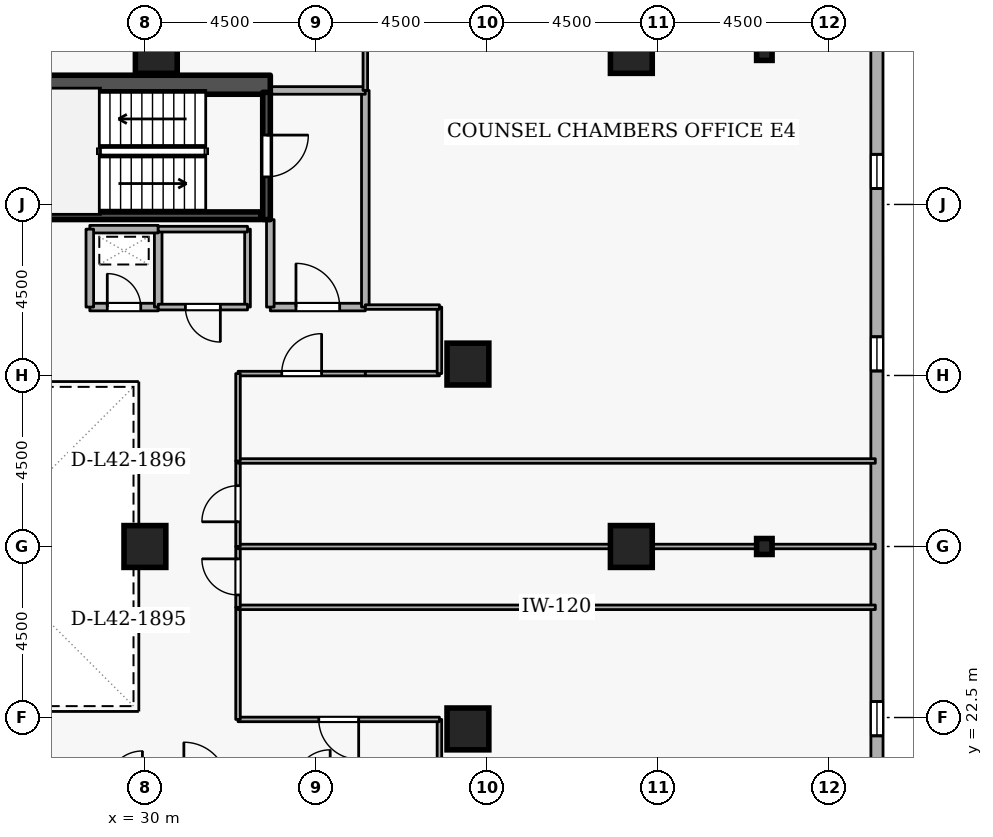
"""IFC4 building model, lengths in metres.
Left out: names, types, materials, properties, quantities, classifications, styles, units other than length and angle.
Written with IfcOpenShell. Run it as: python <this file> out.ifc"""

import sys

from ifc_helpers import new_model, si_unit, direction, frame, frame_2d, origin, origin_2d, place, context, subcontext, project, spatial, rectangle, i_section, extrude, element, fill, save


model = new_model("IFC4")
c1 = context("Model", 3, precision=1e-05, world=origin(), true_north=direction((0.0, 1.0)))
c2 = subcontext(c1, "Body", "Model", "MODEL_VIEW")
j1 = project(units=[si_unit("LENGTHUNIT", "METRE"), si_unit("PLANEANGLEUNIT", "RADIAN")], contexts=[c1])
p1 = place(None, origin())
s1 = spatial("IfcSite", under=j1, at=p1, CompositionType="ELEMENT")
p2 = place(p1, origin())
s2 = spatial("IfcBuilding", under=s1, at=p2, CompositionType="ELEMENT")
p3 = place(p2, frame((0.0, 0.0, 159.9)))
s3 = spatial("IfcBuildingStorey", under=s2, at=p3, CompositionType="ELEMENT", Elevation=159.9)
p4 = place(p3, frame((17.7, 39.15, 0.0), z_axis=(0.0, 0.0, 1.0), x_axis=(1.0, 0.0, 0.0)))
e1 = element("IfcWall", 1, at=p4, inside=s3, PredefinedType="SHEAR", context=c2, shape_type="SweptSolid", body=[
    extrude(rectangle(XDim=15.6, YDim=0.5, at=frame_2d((7.8, 0.0))), origin(), (0.0, 0.0, 1.0), 3.6),
])
for number, where, z_axis, x_axis in (
    (2, (42.8, 27.0, 0.0), (0.0, 0.0, 1.0), (1.0, 0.0, 0.0)),
    (3, (42.8, 40.0, 0.0), (0.0, 0.0, 1.0), (1.0, 0.0, 0.0)),
    (4, (38.5, 22.2, 0.0), (0.0, 0.0, 1.0), (1.0, 0.0, 0.0)),
    (5, (38.5, 31.8, 0.0), (0.0, 0.0, 1.0), (1.0, 0.0, 0.0)),
    (6, (30.3, 40.0, 0.0), (0.0, 0.0, 1.0), (1.0, 0.0, 0.0)),
    (7, (30.0, 27.0, 0.0), (0.0, 0.0, 1.0), (1.0, 0.0, 0.0)),
):
    element("IfcColumn", number, at=place(p3, frame(where, z_axis=z_axis, x_axis=x_axis)), inside=s3, PredefinedType="COLUMN", context=c2, shape_type="SweptSolid", body=[
        extrude(rectangle(XDim=1.1, YDim=1.1, at=origin_2d()), origin(), (0.0, 0.0, 1.0), 3.6),
    ])
for number, where, z_axis, x_axis in (
    (8, (46.3, 27.0, 0.0), (0.0, 0.0, 1.0), (1.0, 0.0, 0.0)),
    (9, (46.3, 40.0, 0.0), (0.0, 0.0, 1.0), (1.0, 0.0, 0.0)),
):
    element("IfcColumn", number, at=place(p3, frame(where, z_axis=z_axis, x_axis=x_axis)), inside=s3, PredefinedType="COLUMN", context=c2, shape_type="SweptSolid", body=[
        extrude(i_section(OverallWidth=0.407, OverallDepth=0.419, WebThickness=0.031, FlangeThickness=0.049, FilletRadius=0.015, at=origin_2d()), origin(), (0.0, 0.0, 1.0), 3.6),
    ])
p5 = place(p3, frame((49.265, 5.819, 0.0), z_axis=(0.0, 0.0, 1.0), x_axis=(-7.5574884e-05, 0.999999997144, 0.0)))
e10 = element("IfcWall", 10, at=p5, inside=s3, PredefinedType="STANDARD", context=c2, shape_type="SweptSolid", body=[
    extrude(rectangle(XDim=35.535, YDim=0.32, at=frame_2d((17.768, 0.0))), origin(), (0.0, 0.0, 1.0), 2.7),
])
p6 = place(p5, frame((1.8, 0.0, 0.72)))
e11 = element("IfcOpeningElement", 11, at=p6, cuts=e10, PredefinedType="OPENING", context=c2, shape_type="SweptSolid", body=[
    extrude(rectangle(XDim=0.9, YDim=1.75, at=frame_2d((0.45, 0.875))), frame((0.0, 0.17, 0.0), z_axis=(0.0, -1.0, 0.0), x_axis=(1.0, 0.0, 0.0)), (0.0, 0.0, 1.0), 0.34),
])
p7 = place(p5, frame((6.6, 0.0, 0.72)))
e12 = element("IfcOpeningElement", 12, at=p7, cuts=e10, PredefinedType="OPENING", context=c2, shape_type="SweptSolid", body=[
    extrude(rectangle(XDim=0.9, YDim=1.75, at=frame_2d((0.45, 0.875))), frame((0.0, 0.17, 0.0), z_axis=(0.0, -1.0, 0.0), x_axis=(1.0, 0.0, 0.0)), (0.0, 0.0, 1.0), 0.34),
])
p8 = place(p5, frame((11.4, 0.0, 0.72)))
e13 = element("IfcOpeningElement", 13, at=p8, cuts=e10, PredefinedType="OPENING", context=c2, shape_type="SweptSolid", body=[
    extrude(rectangle(XDim=0.9, YDim=1.75, at=frame_2d((0.45, 0.875))), frame((0.0, 0.17, 0.0), z_axis=(0.0, -1.0, 0.0), x_axis=(1.0, 0.0, 0.0)), (0.0, 0.0, 1.0), 0.34),
])
p9 = place(p5, frame((16.2, 0.0, 0.72)))
e14 = element("IfcOpeningElement", 14, at=p9, cuts=e10, PredefinedType="OPENING", context=c2, shape_type="SweptSolid", body=[
    extrude(rectangle(XDim=0.9, YDim=1.75, at=frame_2d((0.45, 0.875))), frame((0.0, 0.17, 0.0), z_axis=(0.0, -1.0, 0.0), x_axis=(1.0, 0.0, 0.0)), (0.0, 0.0, 1.0), 0.34),
])
p10 = place(p5, frame((25.8, 0.0, 0.72)))
e15 = element("IfcOpeningElement", 15, at=p10, cuts=e10, PredefinedType="OPENING", context=c2, shape_type="SweptSolid", body=[
    extrude(rectangle(XDim=0.9, YDim=1.75, at=frame_2d((0.45, 0.875))), frame((0.0, 0.17, 0.0), z_axis=(0.0, -1.0, 0.0), x_axis=(1.0, 0.0, 0.0)), (0.0, 0.0, 1.0), 0.34),
])
p11 = place(p5, frame((30.6, 0.0, 0.72)))
e16 = element("IfcOpeningElement", 16, at=p11, cuts=e10, PredefinedType="OPENING", context=c2, shape_type="SweptSolid", body=[
    extrude(rectangle(XDim=0.9, YDim=1.75, at=frame_2d((0.45, 0.875))), frame((0.0, 0.17, 0.0), z_axis=(0.0, -1.0, 0.0), x_axis=(1.0, 0.0, 0.0)), (0.0, 0.0, 1.0), 0.34),
])
p12 = place(p3, frame((33.2, 38.95, 0.0), z_axis=(0.0, 0.0, 1.0), x_axis=(0.0, -1.0, 0.0)))
e17 = element("IfcWall", 17, at=p12, inside=s3, PredefinedType="SHEAR", context=c2, shape_type="SweptSolid", body=[
    extrude(rectangle(XDim=3.35, YDim=0.2, at=frame_2d((1.675, 0.0))), origin(), (0.0, 0.0, 1.0), 3.6),
])
p13 = place(p12, frame((1.125, 0.0, 0.0)))
e18 = element("IfcOpeningElement", 18, at=p13, cuts=e17, PredefinedType="OPENING", context=c2, shape_type="SweptSolid", body=[
    extrude(rectangle(XDim=1.1, YDim=2.1, at=frame_2d((0.55, 1.05))), frame((0.0, 0.11, 0.0), z_axis=(0.0, -1.0, 0.0), x_axis=(1.0, 0.0, 0.0)), (0.0, 0.0, 1.0), 0.22),
])
p14 = place(p3, frame((25.95, 35.703, 0.0), z_axis=(0.0, 0.0, 1.0), x_axis=(1.0, 0.0, 0.0)))
e19 = element("IfcWall", 19, at=p14, inside=s3, PredefinedType="SHEAR", context=c2, shape_type="SweptSolid", body=[
    extrude(rectangle(XDim=7.1, YDim=0.2, at=frame_2d((3.55, 0.0))), origin(), (0.0, 0.0, 1.0), 3.6),
])
p15 = place(p3, frame((33.3, 33.3, 0.0), z_axis=(0.0, 0.0, 1.0), x_axis=(1.0, 0.0, 0.0)))
e20 = element("IfcWall", 20, at=p15, inside=s3, PredefinedType="STANDARD", context=c2, shape_type="SweptSolid", body=[
    extrude(rectangle(XDim=2.5, YDim=0.2, at=frame_2d((1.25, 0.0))), origin(), (0.0, 0.0, 1.0), 3.34),
])
p16 = place(p15, frame((0.675, 0.0, 0.0)))
e21 = element("IfcOpeningElement", 21, at=p16, cuts=e20, PredefinedType="OPENING", context=c2, shape_type="SweptSolid", body=[
    extrude(rectangle(XDim=1.15, YDim=2.1, at=frame_2d((0.575, 1.05))), frame((0.0, 0.11, 0.0), z_axis=(0.0, -1.0, 0.0), x_axis=(1.0, 0.0, 0.0)), (0.0, 0.0, 1.0), 0.22),
])
p17 = place(p3, frame((35.8, 33.3, 0.0), z_axis=(0.0, 0.0, 1.0), x_axis=(0.0, 1.0, 0.0)))
e22 = element("IfcWall", 22, at=p17, inside=s3, PredefinedType="STANDARD", context=c2, shape_type="SweptSolid", body=[
    extrude(rectangle(XDim=5.7, YDim=0.2, at=frame_2d((2.85, 0.0))), origin(), (0.0, 0.0, 1.0), 3.34),
])
p18 = place(p3, frame((35.8, 39.0, 0.0), z_axis=(0.0, 0.0, 1.0), x_axis=(-1.0, 0.0, 0.0)))
e23 = element("IfcWall", 23, at=p18, inside=s3, PredefinedType="STANDARD", context=c2, shape_type="SweptSolid", body=[
    extrude(rectangle(XDim=2.5, YDim=0.2, at=frame_2d((1.25, 0.0))), origin(), (0.0, 0.0, 1.0), 3.34),
])
p19 = place(p3, frame((33.3, 35.6, 0.0), z_axis=(0.0, 0.0, 1.0), x_axis=(0.0, -1.0, 0.0)))
e24 = element("IfcWall", 24, at=p19, inside=s3, PredefinedType="STANDARD", context=c2, shape_type="SweptSolid", body=[
    extrude(rectangle(XDim=2.3, YDim=0.2, at=frame_2d((1.15, 0.0))), origin(), (0.0, 0.0, 1.0), 2.545),
])
p20 = place(p3, frame((28.55, 33.3, 0.0), z_axis=(0.0, 0.0, 1.0), x_axis=(1.0, 0.0, 0.0)))
e25 = element("IfcWall", 25, at=p20, inside=s3, PredefinedType="STANDARD", context=c2, shape_type="SweptSolid", body=[
    extrude(rectangle(XDim=1.8, YDim=0.2, at=frame_2d((0.9, 0.0))), origin(), (0.0, 0.0, 1.0), 3.34),
])
p21 = place(p20, frame((0.46, 0.0, 0.0)))
e26 = element("IfcOpeningElement", 26, at=p21, cuts=e25, PredefinedType="OPENING", context=c2, shape_type="SweptSolid", body=[
    extrude(rectangle(XDim=0.88, YDim=2.04, at=frame_2d((0.44, 1.02))), frame((0.0, 0.11, 0.0), z_axis=(0.0, -1.0, 0.0), x_axis=(1.0, 0.0, 0.0)), (0.0, 0.0, 1.0), 0.22),
])
p22 = place(p3, frame((30.35, 33.3, 0.0), z_axis=(0.0, 0.0, 1.0), x_axis=(0.0, 1.0, 0.0)))
e27 = element("IfcWall", 27, at=p22, inside=s3, PredefinedType="STANDARD", context=c2, shape_type="SweptSolid", body=[
    extrude(rectangle(XDim=2.05, YDim=0.2, at=frame_2d((1.025, 0.0))), origin(), (0.0, 0.0, 1.0), 3.34),
])
p23 = place(p3, frame((30.35, 35.35, 0.0), z_axis=(0.0, 0.0, 1.0), x_axis=(-1.0, 0.0, 0.0)))
e28 = element("IfcWall", 28, at=p23, inside=s3, PredefinedType="STANDARD", context=c2, shape_type="SweptSolid", body=[
    extrude(rectangle(XDim=1.8, YDim=0.2, at=frame_2d((0.9, 0.0))), origin(), (0.0, 0.0, 1.0), 3.34),
])
p24 = place(p3, frame((28.55, 35.35, 0.0), z_axis=(0.0, 0.0, 1.0), x_axis=(0.0, -1.0, 0.0)))
e29 = element("IfcWall", 29, at=p24, inside=s3, PredefinedType="STANDARD", context=c2, shape_type="SweptSolid", body=[
    extrude(rectangle(XDim=2.05, YDim=0.2, at=frame_2d((1.025, 0.0))), origin(), (0.0, 0.0, 1.0), 3.34),
])
p25 = place(p3, frame((32.7, 35.35, 0.0), z_axis=(0.0, 0.0, 1.0), x_axis=(0.0, -1.0, 0.0)))
e30 = element("IfcWall", 30, at=p25, inside=s3, PredefinedType="PARTITIONING", context=c2, shape_type="SweptSolid", body=[
    extrude(rectangle(XDim=2.05, YDim=0.15, at=frame_2d((1.025, 0.0))), origin(), (0.0, 0.0, 1.0), 2.545),
])
p26 = place(p3, frame((32.7, 33.3, 0.0), z_axis=(0.0, 0.0, 1.0), x_axis=(-1.0, 0.0, 0.0)))
e31 = element("IfcWall", 31, at=p26, inside=s3, PredefinedType="PARTITIONING", context=c2, shape_type="SweptSolid", body=[
    extrude(rectangle(XDim=2.35, YDim=0.15, at=frame_2d((1.175, 0.0))), origin(), (0.0, 0.0, 1.0), 3.34),
])
p27 = place(p26, frame((0.715, 0.0, 0.0)))
e32 = element("IfcOpeningElement", 32, at=p27, cuts=e31, PredefinedType="OPENING", context=c2, shape_type="SweptSolid", body=[
    extrude(rectangle(XDim=0.92, YDim=2.08, at=frame_2d((0.46, 1.04))), frame((0.0, 0.085, 0.0), z_axis=(0.0, -1.0, 0.0), x_axis=(1.0, 0.0, 0.0)), (0.0, 0.0, 1.0), 0.17),
])
p28 = place(p3, frame((30.35, 35.35, 0.0), z_axis=(0.0, 0.0, 1.0), x_axis=(1.0, 0.0, 0.0)))
e33 = element("IfcWall", 33, at=p28, inside=s3, PredefinedType="PARTITIONING", context=c2, shape_type="SweptSolid", body=[
    extrude(rectangle(XDim=2.35, YDim=0.15, at=frame_2d((1.175, 0.0))), origin(), (0.0, 0.0, 1.0), 3.34),
])
p29 = place(p3, frame((37.75, 20.7, 0.0), z_axis=(0.0, 0.0, 1.0), x_axis=(0.0, 1.0, 0.0)))
e34 = element("IfcWall", 34, at=p29, inside=s3, PredefinedType="PARTITIONING", context=c2, shape_type="SweptSolid", body=[
    extrude(rectangle(XDim=1.75, YDim=0.12, at=frame_2d((0.875, 0.0))), origin(), (0.0, 0.0, 1.0), 3.34),
])
p30 = place(p3, frame((37.75, 22.45, 0.0), z_axis=(0.0, 0.0, 1.0), x_axis=(-1.0, 0.0, 0.0)))
e35 = element("IfcWall", 35, at=p30, inside=s3, PredefinedType="PARTITIONING", context=c2, shape_type="SweptSolid", body=[
    extrude(rectangle(XDim=5.3, YDim=0.12, at=frame_2d((2.65, 0.0))), origin(), (0.0, 0.0, 1.0), 3.34),
])
p31 = place(p30, frame((2.125, 0.0, 0.0)))
e36 = element("IfcOpeningElement", 36, at=p31, cuts=e35, PredefinedType="OPENING", context=c2, shape_type="SweptSolid", body=[
    extrude(rectangle(XDim=1.05, YDim=2.1, at=frame_2d((0.525, 1.05))), frame((0.0, 0.07, 0.0), z_axis=(0.0, -1.0, 0.0), x_axis=(1.0, 0.0, 0.0)), (0.0, 0.0, 1.0), 0.14),
])
p32 = place(p3, frame((32.45, 22.45, 0.0), z_axis=(0.0, 0.0, 1.0), x_axis=(0.0, 1.0, 0.0)))
e37 = element("IfcWall", 37, at=p32, inside=s3, PredefinedType="PARTITIONING", context=c2, shape_type="SweptSolid", body=[
    extrude(rectangle(XDim=2.95, YDim=0.12, at=frame_2d((1.475, 0.0))), origin(), (0.0, 0.0, 1.0), 3.34),
])
p33 = place(p3, frame((32.45, 25.4, 0.0), z_axis=(0.0, 0.0, 1.0), x_axis=(1.0, 0.0, 0.0)))
e38 = element("IfcWall", 38, at=p33, inside=s3, PredefinedType="PARTITIONING", context=c2, shape_type="SweptSolid", body=[
    extrude(rectangle(XDim=16.77, YDim=0.12, at=frame_2d((8.385, 0.0))), origin(), (0.0, 0.0, 1.0), 3.34),
])
p34 = place(p3, frame((32.45, 25.4, 0.0), z_axis=(0.0, 0.0, 1.0), x_axis=(0.0, 1.0, 0.0)))
e39 = element("IfcWall", 39, at=p34, inside=s3, PredefinedType="PARTITIONING", context=c2, shape_type="SweptSolid", body=[
    extrude(rectangle(XDim=1.6, YDim=0.12, at=frame_2d((0.8, 0.0))), origin(), (0.0, 0.0, 1.0), 3.34),
])
p35 = place(p34, frame((0.325, 0.0, 0.0)))
e40 = element("IfcOpeningElement", 40, at=p35, cuts=e39, PredefinedType="OPENING", context=c2, shape_type="SweptSolid", body=[
    extrude(rectangle(XDim=0.95, YDim=2.1, at=frame_2d((0.475, 1.05))), frame((0.0, 0.07, 0.0), z_axis=(0.0, -1.0, 0.0), x_axis=(1.0, 0.0, 0.0)), (0.0, 0.0, 1.0), 0.14),
])
p36 = place(p3, frame((32.45, 27.0, 0.0), z_axis=(0.0, 0.0, 1.0), x_axis=(1.0, 0.0, 0.0)))
e41 = element("IfcWall", 41, at=p36, inside=s3, PredefinedType="PARTITIONING", context=c2, shape_type="SweptSolid", body=[
    extrude(rectangle(XDim=16.77, YDim=0.12, at=frame_2d((8.385, 0.0))), origin(), (0.0, 0.0, 1.0), 2.878),
])
p37 = place(p3, frame((32.45, 27.0, 0.0), z_axis=(0.0, 0.0, 1.0), x_axis=(0.0, 1.0, 0.0)))
e42 = element("IfcWall", 42, at=p37, inside=s3, PredefinedType="PARTITIONING", context=c2, shape_type="SweptSolid", body=[
    extrude(rectangle(XDim=2.25, YDim=0.12, at=frame_2d((1.125, 0.0))), origin(), (0.0, 0.0, 1.0), 3.34),
])
p38 = place(p37, frame((0.65, 0.0, 0.0)))
e43 = element("IfcOpeningElement", 43, at=p38, cuts=e42, PredefinedType="OPENING", context=c2, shape_type="SweptSolid", body=[
    extrude(rectangle(XDim=0.95, YDim=2.1, at=frame_2d((0.475, 1.05))), frame((0.0, 0.07, 0.0), z_axis=(0.0, -1.0, 0.0), x_axis=(1.0, 0.0, 0.0)), (0.0, 0.0, 1.0), 0.14),
])
p39 = place(p3, frame((32.45, 29.25, 0.0), z_axis=(0.0, 0.0, 1.0), x_axis=(1.0, 0.0, 0.0)))
e44 = element("IfcWall", 44, at=p39, inside=s3, PredefinedType="PARTITIONING", context=c2, shape_type="SweptSolid", body=[
    extrude(rectangle(XDim=16.77, YDim=0.12, at=frame_2d((8.385, 0.0))), origin(), (0.0, 0.0, 1.0), 3.34),
])
p40 = place(p3, frame((32.45, 31.55, 0.0), z_axis=(0.0, 0.0, 1.0), x_axis=(1.0, 0.0, 0.0)))
e45 = element("IfcWall", 45, at=p40, inside=s3, PredefinedType="PARTITIONING", context=c2, shape_type="SweptSolid", body=[
    extrude(rectangle(XDim=3.35, YDim=0.12, at=frame_2d((1.675, 0.0))), origin(), (0.0, 0.0, 1.0), 3.34),
])
p41 = place(p40, frame((1.15, 0.0, 0.0)))
e46 = element("IfcOpeningElement", 46, at=p41, cuts=e45, PredefinedType="OPENING", context=c2, shape_type="SweptSolid", body=[
    extrude(rectangle(XDim=1.05, YDim=2.1, at=frame_2d((0.525, 1.05))), frame((0.0, 0.07, 0.0), z_axis=(0.0, -1.0, 0.0), x_axis=(1.0, 0.0, 0.0)), (0.0, 0.0, 1.0), 0.14),
])
p42 = place(p3, frame((35.8, 31.55, 0.0), z_axis=(0.0, 0.0, 1.0), x_axis=(1.0, 0.0, 0.0)))
e47 = element("IfcWall", 47, at=p42, inside=s3, PredefinedType="PARTITIONING", context=c2, shape_type="SweptSolid", body=[
    extrude(rectangle(XDim=1.95, YDim=0.12, at=frame_2d((0.975, 0.0))), origin(), (0.0, 0.0, 1.0), 3.34),
])
p43 = place(p3, frame((37.75, 31.55, 0.0), z_axis=(0.0, 0.0, 1.0), x_axis=(0.0, 1.0, 0.0)))
e48 = element("IfcWall", 48, at=p43, inside=s3, PredefinedType="PARTITIONING", context=c2, shape_type="SweptSolid", body=[
    extrude(rectangle(XDim=1.75, YDim=0.12, at=frame_2d((0.875, 0.0))), origin(), (0.0, 0.0, 1.0), 3.34),
])
p44 = place(p3, frame((37.75, 33.3, 0.0), z_axis=(0.0, 0.0, 1.0), x_axis=(-1.0, 0.0, 0.0)))
e49 = element("IfcWall", 49, at=p44, inside=s3, PredefinedType="PARTITIONING", context=c2, shape_type="SweptSolid", body=[
    extrude(rectangle(XDim=1.95, YDim=0.12, at=frame_2d((0.975, 0.0))), origin(), (0.0, 0.0, 1.0), 3.34),
])
p45 = place(p3, frame((35.8, 39.0, 0.0), z_axis=(0.0, 0.0, 1.0), x_axis=(0.0, 1.0, 0.0)))
e50 = element("IfcWall", 50, at=p45, inside=s3, PredefinedType="PARTITIONING", context=c2, shape_type="SweptSolid", body=[
    extrude(rectangle(XDim=5.72, YDim=0.12, at=frame_2d((2.86, 0.0))), origin(), (0.0, 0.0, 1.0), 3.34),
])
p46 = place(p3, frame((32.45, 29.25, 0.0), z_axis=(0.0, 0.0, 1.0), x_axis=(0.0, 1.0, 0.0)))
e51 = element("IfcWall", 51, at=p46, inside=s3, PredefinedType="PARTITIONING", context=c2, shape_type="SweptSolid", body=[
    extrude(rectangle(XDim=2.3, YDim=0.12, at=frame_2d((1.15, 0.0))), origin(), (0.0, 0.0, 1.0), 3.34),
])
p47 = place(p9, origin())
e52 = element("IfcWindow", 52, at=p47, inside=s3, PartitioningType="SINGLE_PANEL", PredefinedType="WINDOW", context=c2, shape_type="SweptSolid", body=[
    extrude(rectangle(XDim=0.9, YDim=1.75, at=frame_2d((0.45, 0.875))), frame((0.0, 0.03, 0.0), z_axis=(0.0, -1.0, 0.0), x_axis=(1.0, 0.0, 0.0)), (0.0, 0.0, 1.0), 0.06),
])
fill(e14, e52)
p48 = place(p10, origin())
e53 = element("IfcWindow", 53, at=p48, inside=s3, PartitioningType="SINGLE_PANEL", PredefinedType="WINDOW", context=c2, shape_type="SweptSolid", body=[
    extrude(rectangle(XDim=0.9, YDim=1.75, at=frame_2d((0.45, 0.875))), frame((0.0, 0.03, 0.0), z_axis=(0.0, -1.0, 0.0), x_axis=(1.0, 0.0, 0.0)), (0.0, 0.0, 1.0), 0.06),
])
fill(e15, e53)
p49 = place(p11, origin())
e54 = element("IfcWindow", 54, at=p49, inside=s3, PartitioningType="SINGLE_PANEL", PredefinedType="WINDOW", context=c2, shape_type="SweptSolid", body=[
    extrude(rectangle(XDim=0.9, YDim=1.75, at=frame_2d((0.45, 0.875))), frame((0.0, 0.03, 0.0), z_axis=(0.0, -1.0, 0.0), x_axis=(1.0, 0.0, 0.0)), (0.0, 0.0, 1.0), 0.06),
])
fill(e16, e54)
p50 = place(p13, origin())
e55 = element("IfcDoor", 55, at=p50, inside=s3, OperationType="SINGLE_SWING_LEFT", PredefinedType="DOOR", context=c2, shape_type="SweptSolid", body=[
    extrude(rectangle(XDim=1.1, YDim=2.1, at=frame_2d((0.55, 1.05))), frame((0.0, 0.025, 0.0), z_axis=(0.0, -1.0, 0.0), x_axis=(1.0, 0.0, 0.0)), (0.0, 0.0, 1.0), 0.05),
])
fill(e18, e55)
p51 = place(p16, origin())
e56 = element("IfcDoor", 56, at=p51, inside=s3, OperationType="SINGLE_SWING_LEFT", PredefinedType="DOOR", context=c2, shape_type="SweptSolid", body=[
    extrude(rectangle(XDim=1.15, YDim=2.1, at=frame_2d((0.575, 1.05))), frame((0.0, 0.025, 0.0), z_axis=(0.0, -1.0, 0.0), x_axis=(1.0, 0.0, 0.0)), (0.0, 0.0, 1.0), 0.05),
])
fill(e21, e56)
p52 = place(p21, origin())
e57 = element("IfcDoor", 57, at=p52, inside=s3, OperationType="SINGLE_SWING_LEFT", PredefinedType="DOOR", context=c2, shape_type="SweptSolid", body=[
    extrude(rectangle(XDim=0.88, YDim=2.04, at=frame_2d((0.44, 1.02))), frame((0.0, 0.025, 0.0), z_axis=(0.0, -1.0, 0.0), x_axis=(1.0, 0.0, 0.0)), (0.0, 0.0, 1.0), 0.05),
])
fill(e26, e57)
p53 = place(p27, origin())
e58 = element("IfcDoor", 58, at=p53, inside=s3, OperationType="SINGLE_SWING_LEFT", PredefinedType="DOOR", context=c2, shape_type="SweptSolid", body=[
    extrude(rectangle(XDim=0.92, YDim=2.08, at=frame_2d((0.46, 1.04))), frame((0.0, 0.025, 0.0), z_axis=(0.0, -1.0, 0.0), x_axis=(1.0, 0.0, 0.0)), (0.0, 0.0, 1.0), 0.05),
])
fill(e32, e58)
p54 = place(p31, origin())
e59 = element("IfcDoor", 59, at=p54, inside=s3, OperationType="SINGLE_SWING_LEFT", PredefinedType="DOOR", context=c2, shape_type="SweptSolid", body=[
    extrude(rectangle(XDim=1.05, YDim=2.1, at=frame_2d((0.525, 1.05))), frame((0.0, 0.025, 0.0), z_axis=(0.0, -1.0, 0.0), x_axis=(1.0, 0.0, 0.0)), (0.0, 0.0, 1.0), 0.05),
])
fill(e36, e59)
p55 = place(p35, origin())
e60 = element("IfcDoor", 60, at=p55, inside=s3, OperationType="SINGLE_SWING_RIGHT", PredefinedType="DOOR", context=c2, shape_type="SweptSolid", body=[
    extrude(rectangle(XDim=0.95, YDim=2.1, at=frame_2d((0.475, 1.05))), frame((0.0, 0.025, 0.0), z_axis=(0.0, -1.0, 0.0), x_axis=(1.0, 0.0, 0.0)), (0.0, 0.0, 1.0), 0.05),
])
fill(e40, e60)
p56 = place(p38, origin())
e61 = element("IfcDoor", 61, at=p56, inside=s3, OperationType="SINGLE_SWING_LEFT", PredefinedType="DOOR", context=c2, shape_type="SweptSolid", body=[
    extrude(rectangle(XDim=0.95, YDim=2.1, at=frame_2d((0.475, 1.05))), frame((0.0, 0.025, 0.0), z_axis=(0.0, -1.0, 0.0), x_axis=(1.0, 0.0, 0.0)), (0.0, 0.0, 1.0), 0.05),
])
fill(e43, e61)
p57 = place(p41, origin())
e62 = element("IfcDoor", 62, at=p57, inside=s3, OperationType="SINGLE_SWING_RIGHT", PredefinedType="DOOR", context=c2, shape_type="SweptSolid", body=[
    extrude(rectangle(XDim=1.05, YDim=2.1, at=frame_2d((0.525, 1.05))), frame((0.0, 0.025, 0.0), z_axis=(0.0, -1.0, 0.0), x_axis=(1.0, 0.0, 0.0)), (0.0, 0.0, 1.0), 0.05),
])
fill(e46, e62)
save(model, sys.argv[1])
